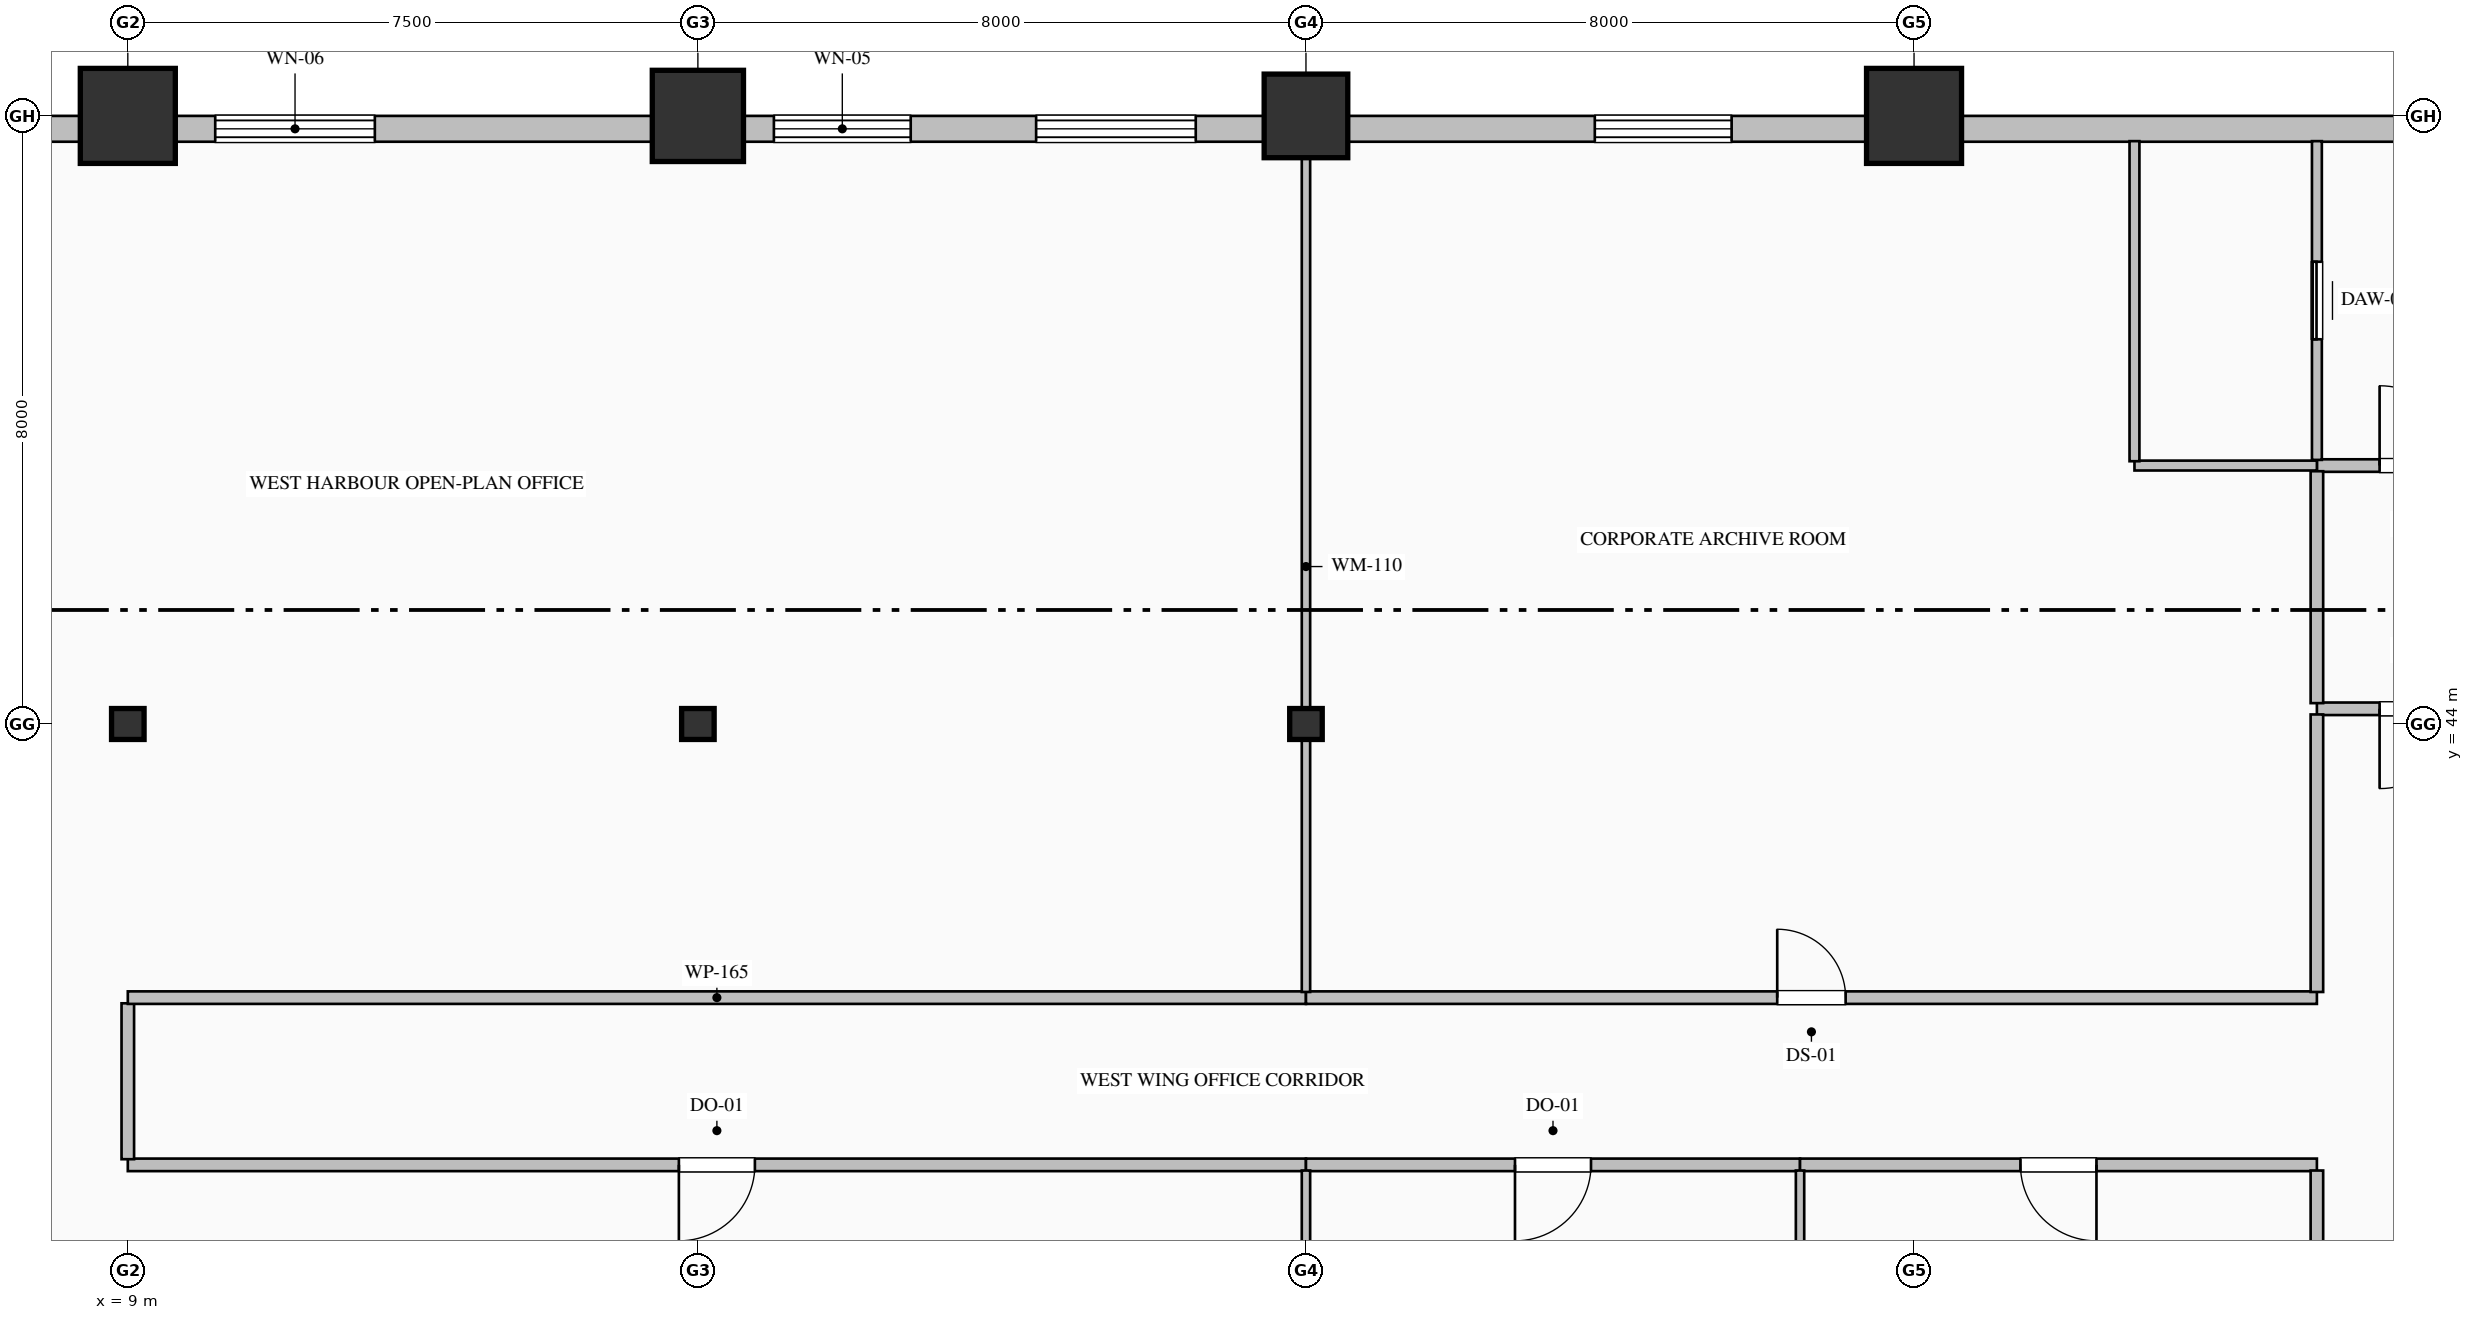
"""IFC4 building model, lengths in metres.
Left out: names, types, materials, properties, quantities, classifications, styles, units other than length and angle.
Written with IfcOpenShell. Run it as: python <this file> out.ifc"""

import sys

from ifc_helpers import new_model, si_unit, direction, frame, frame_2d, origin, origin_2d, place, context, subcontext, project, spatial, rectangle, hollow_rectangle, hollow_circle, i_section, extrude, element, fill, save


model = new_model("IFC4")
c1 = context("Model", 3, precision=1e-05, world=origin(), true_north=direction((0.0, 1.0)))
c2 = subcontext(c1, "Body", "Model", "MODEL_VIEW")
j1 = project(units=[si_unit("LENGTHUNIT", "METRE"), si_unit("PLANEANGLEUNIT", "RADIAN")], contexts=[c1])
p1 = place(None, origin())
s1 = spatial("IfcSite", under=j1, at=p1, CompositionType="ELEMENT")
p2 = place(p1, origin())
s2 = spatial("IfcBuilding", under=s1, at=p2, CompositionType="ELEMENT")
p3 = place(p2, frame((0.0, 0.0, 56.2)))
s3 = spatial("IfcBuildingStorey", under=s2, at=p3, CompositionType="ELEMENT", Elevation=56.2)
p4 = place(p3, frame((9.0, 44.0, 0.0), z_axis=(0.0, 0.0, 1.0), x_axis=(1.0, 0.0, 0.0)))
e1 = element("IfcColumn", 1, at=p4, inside=s3, PredefinedType="COLUMN", context=c2, shape_type="SweptSolid", body=[
    extrude(i_section(OverallWidth=0.407, OverallDepth=0.428, WebThickness=0.02, FlangeThickness=0.035, FilletRadius=0.022, at=origin_2d()), origin(), (0.0, 0.0, 1.0), 4.0),
])
p5 = place(p3, frame((9.0, 52.0, 0.0), z_axis=(0.0, 0.0, 1.0), x_axis=(1.0, 0.0, 0.0)))
e2 = element("IfcColumn", 2, at=p5, inside=s3, PredefinedType="COLUMN", context=c2, shape_type="SweptSolid", body=[
    extrude(hollow_rectangle(XDim=1.25, YDim=1.25, WallThickness=0.045, at=origin_2d()), origin(), (0.0, 0.0, 1.0), 4.0),
])
p6 = place(p3, frame((16.5, 44.0, 0.0), z_axis=(0.0, 0.0, 1.0), x_axis=(1.0, 0.0, 0.0)))
e3 = element("IfcColumn", 3, at=p6, inside=s3, PredefinedType="COLUMN", context=c2, shape_type="SweptSolid", body=[
    extrude(i_section(OverallWidth=0.407, OverallDepth=0.428, WebThickness=0.02, FlangeThickness=0.035, FilletRadius=0.022, at=origin_2d()), origin(), (0.0, 0.0, 1.0), 4.0),
])
p7 = place(p3, frame((16.5, 52.0, 0.0), z_axis=(0.0, 0.0, 1.0), x_axis=(1.0, 0.0, 0.0)))
e4 = element("IfcColumn", 4, at=p7, inside=s3, PredefinedType="COLUMN", context=c2, shape_type="SweptSolid", body=[
    extrude(hollow_circle(Radius=0.6, WallThickness=0.04, at=origin_2d()), origin(), (0.0, 0.0, 1.0), 4.0),
])
p8 = place(p3, frame((24.5, 44.0, 0.0), z_axis=(0.0, 0.0, 1.0), x_axis=(1.0, 0.0, 0.0)))
e5 = element("IfcColumn", 5, at=p8, inside=s3, PredefinedType="COLUMN", context=c2, shape_type="SweptSolid", body=[
    extrude(i_section(OverallWidth=0.407, OverallDepth=0.428, WebThickness=0.02, FlangeThickness=0.035, FilletRadius=0.022, at=origin_2d()), origin(), (0.0, 0.0, 1.0), 4.0),
])
p9 = place(p3, frame((24.5, 52.0, 0.0), z_axis=(0.0, 0.0, 1.0), x_axis=(1.0, 0.0, 0.0)))
e6 = element("IfcColumn", 6, at=p9, inside=s3, PredefinedType="COLUMN", context=c2, shape_type="SweptSolid", body=[
    extrude(hollow_rectangle(XDim=1.1, YDim=1.1, WallThickness=0.04, at=origin_2d()), origin(), (0.0, 0.0, 1.0), 4.0),
])
p10 = place(p3, frame((32.5, 52.0, 0.0), z_axis=(0.0, 0.0, 1.0), x_axis=(1.0, 0.0, 0.0)))
e7 = element("IfcColumn", 7, at=p10, inside=s3, PredefinedType="COLUMN", context=c2, shape_type="SweptSolid", body=[
    extrude(hollow_rectangle(XDim=1.25, YDim=1.25, WallThickness=0.045, at=origin_2d()), origin(), (0.0, 0.0, 1.0), 4.0),
])
p11 = place(p3, frame((4.0, 51.83, 0.0), z_axis=(0.0, 0.0, 1.0), x_axis=(1.0, 0.0, 0.0)))
e8 = element("IfcWall", 8, at=p11, inside=s3, PredefinedType="SOLIDWALL", context=c2, shape_type="SweptSolid", body=[
    extrude(rectangle(XDim=36.52, YDim=0.34, at=frame_2d((18.26, 0.0))), origin(), (0.0, 0.0, 1.0), 3.25),
])
p12 = place(p11, frame((6.15, 0.0, 0.85)))
e9 = element("IfcOpeningElement", 9, at=p12, cuts=e8, PredefinedType="OPENING", context=c2, shape_type="SweptSolid", body=[
    extrude(rectangle(XDim=2.1, YDim=2.05, at=frame_2d((1.05, 1.025))), frame((0.0, 0.18, 0.0), z_axis=(0.0, -1.0, 0.0), x_axis=(1.0, 0.0, 0.0)), (0.0, 0.0, 1.0), 0.36),
])
p13 = place(p11, frame((13.5, 0.0, 0.85)))
e10 = element("IfcOpeningElement", 10, at=p13, cuts=e8, PredefinedType="OPENING", context=c2, shape_type="SweptSolid", body=[
    extrude(rectangle(XDim=1.8, YDim=2.05, at=frame_2d((0.9, 1.025))), frame((0.0, 0.18, 0.0), z_axis=(0.0, -1.0, 0.0), x_axis=(1.0, 0.0, 0.0)), (0.0, 0.0, 1.0), 0.36),
])
p14 = place(p11, frame((16.95, 0.0, 0.85)))
e11 = element("IfcOpeningElement", 11, at=p14, cuts=e8, PredefinedType="OPENING", context=c2, shape_type="SweptSolid", body=[
    extrude(rectangle(XDim=2.1, YDim=2.05, at=frame_2d((1.05, 1.025))), frame((0.0, 0.18, 0.0), z_axis=(0.0, -1.0, 0.0), x_axis=(1.0, 0.0, 0.0)), (0.0, 0.0, 1.0), 0.36),
])
p15 = place(p11, frame((24.3, 0.0, 0.85)))
e12 = element("IfcOpeningElement", 12, at=p15, cuts=e8, PredefinedType="OPENING", context=c2, shape_type="SweptSolid", body=[
    extrude(rectangle(XDim=1.8, YDim=2.05, at=frame_2d((0.9, 1.025))), frame((0.0, 0.18, 0.0), z_axis=(0.0, -1.0, 0.0), x_axis=(1.0, 0.0, 0.0)), (0.0, 0.0, 1.0), 0.36),
])
p16 = place(p3, frame((37.8, 47.4, 0.0), z_axis=(0.0, 0.0, 1.0), x_axis=(1.0, 0.0, 0.0)))
e13 = element("IfcWall", 13, at=p16, inside=s3, PredefinedType="PARTITIONING", context=c2, shape_type="SweptSolid", body=[
    extrude(rectangle(XDim=2.7, YDim=0.165, at=frame_2d((1.35, 0.0))), origin(), (0.0, 0.0, 1.0), 3.75),
])
p17 = place(p16, frame((0.825, 0.0, 0.0)))
e14 = element("IfcOpeningElement", 14, at=p17, cuts=e13, PredefinedType="OPENING", context=c2, shape_type="SweptSolid", body=[
    extrude(rectangle(XDim=1.05, YDim=2.15, at=frame_2d((0.525, 1.075))), frame((0.0, 0.093, 0.0), z_axis=(0.0, -1.0, 0.0), x_axis=(1.0, 0.0, 0.0)), (0.0, 0.0, 1.0), 0.185),
])
p18 = place(p3, frame((40.5, 44.2, 0.0), z_axis=(0.0, 0.0, 1.0), x_axis=(-1.0, 0.0, 0.0)))
e15 = element("IfcWall", 15, at=p18, inside=s3, PredefinedType="PARTITIONING", context=c2, shape_type="SweptSolid", body=[
    extrude(rectangle(XDim=2.7, YDim=0.165, at=frame_2d((1.35, 0.0))), origin(), (0.0, 0.0, 1.0), 3.75),
])
p19 = place(p18, frame((0.825, 0.0, 0.0)))
e16 = element("IfcOpeningElement", 16, at=p19, cuts=e15, PredefinedType="OPENING", context=c2, shape_type="SweptSolid", body=[
    extrude(rectangle(XDim=1.05, YDim=2.15, at=frame_2d((0.525, 1.075))), frame((0.0, 0.093, 0.0), z_axis=(0.0, -1.0, 0.0), x_axis=(1.0, 0.0, 0.0)), (0.0, 0.0, 1.0), 0.185),
])
p20 = place(p3, frame((37.8, 44.274, 0.0), z_axis=(0.0, 0.0, 1.0), x_axis=(0.0, 1.0, 0.0)))
e17 = element("IfcWall", 17, at=p20, inside=s3, PredefinedType="PARTITIONING", context=c2, shape_type="SweptSolid", body=[
    extrude(rectangle(XDim=3.051, YDim=0.165, at=frame_2d((1.525, 0.0))), origin(), (0.0, 0.0, 1.0), 3.75),
])
p21 = place(p3, frame((37.8, 47.475, 0.0), z_axis=(0.0, 0.0, 1.0), x_axis=(0.0, 1.0, 0.0)))
e18 = element("IfcWall", 18, at=p21, inside=s3, PredefinedType="PARTITIONING", context=c2, shape_type="SweptSolid", body=[
    extrude(rectangle(XDim=4.193, YDim=0.13, at=frame_2d((2.097, 0.0))), origin(), (0.0, 0.0, 1.0), 3.75),
])
p22 = place(p21, frame((1.587, 0.0, 0.0)))
e19 = element("IfcOpeningElement", 19, at=p22, cuts=e18, PredefinedType="OPENING", context=c2, shape_type="SweptSolid", body=[
    extrude(rectangle(XDim=1.02, YDim=2.15, at=frame_2d((0.51, 1.075))), frame((0.0, 0.075, 0.0), z_axis=(0.0, -1.0, 0.0), x_axis=(1.0, 0.0, 0.0)), (0.0, 0.0, 1.0), 0.15),
])
p23 = place(p3, frame((37.8, 47.4, 0.0), z_axis=(0.0, 0.0, 1.0), x_axis=(-1.0, 0.0, 0.0)))
e20 = element("IfcWall", 20, at=p23, inside=s3, PredefinedType="PARTITIONING", context=c2, shape_type="SweptSolid", body=[
    extrude(rectangle(XDim=2.4, YDim=0.13, at=frame_2d((1.2, 0.0))), origin(), (0.0, 0.0, 1.0), 3.75),
])
p24 = place(p3, frame((35.4, 47.457, 0.0), z_axis=(0.0, 0.0, 1.0), x_axis=(0.0, 1.0, 0.0)))
e21 = element("IfcWall", 21, at=p24, inside=s3, PredefinedType="PARTITIONING", context=c2, shape_type="SweptSolid", body=[
    extrude(rectangle(XDim=4.211, YDim=0.13, at=frame_2d((2.105, 0.0))), origin(), (0.0, 0.0, 1.0), 3.75),
])
p25 = place(p3, frame((24.5, 38.2, 0.0), z_axis=(0.0, 0.0, 1.0), x_axis=(-1.0, 0.0, 0.0)))
e22 = element("IfcWall", 22, at=p25, inside=s3, PredefinedType="PARTITIONING", context=c2, shape_type="SweptSolid", body=[
    extrude(rectangle(XDim=15.5, YDim=0.165, at=frame_2d((7.75, 0.0))), origin(), (0.0, 0.0, 1.0), 3.75),
])
p26 = place(p25, frame((7.25, 0.0, 0.0)))
e23 = element("IfcOpeningElement", 23, at=p26, cuts=e22, PredefinedType="OPENING", context=c2, shape_type="SweptSolid", body=[
    extrude(rectangle(XDim=1.0, YDim=2.15, at=frame_2d((0.5, 1.075))), frame((0.0, 0.093, 0.0), z_axis=(0.0, -1.0, 0.0), x_axis=(1.0, 0.0, 0.0)), (0.0, 0.0, 1.0), 0.185),
])
p27 = place(p3, frame((9.0, 38.274, 0.0), z_axis=(0.0, 0.0, 1.0), x_axis=(0.0, 1.0, 0.0)))
e24 = element("IfcWall", 24, at=p27, inside=s3, PredefinedType="PARTITIONING", context=c2, shape_type="SweptSolid", body=[
    extrude(rectangle(XDim=2.051, YDim=0.165, at=frame_2d((1.025, 0.0))), origin(), (0.0, 0.0, 1.0), 3.042),
])
p28 = place(p3, frame((9.0, 40.4, 0.0), z_axis=(0.0, 0.0, 1.0), x_axis=(1.0, 0.0, 0.0)))
e25 = element("IfcWall", 25, at=p28, inside=s3, PredefinedType="PARTITIONING", context=c2, shape_type="SweptSolid", body=[
    extrude(rectangle(XDim=15.5, YDim=0.165, at=frame_2d((7.75, 0.0))), origin(), (0.0, 0.0, 1.0), 3.75),
])
p29 = place(p3, frame((24.5, 40.4, 0.0), z_axis=(0.0, 0.0, 1.0), x_axis=(1.0, 0.0, 0.0)))
e26 = element("IfcWall", 26, at=p29, inside=s3, PredefinedType="PARTITIONING", context=c2, shape_type="SweptSolid", body=[
    extrude(rectangle(XDim=13.3, YDim=0.165, at=frame_2d((6.65, 0.0))), origin(), (0.0, 0.0, 1.0), 3.75),
])
p30 = place(p29, frame((6.2, 0.0, 0.0)))
e27 = element("IfcOpeningElement", 27, at=p30, cuts=e26, PredefinedType="OPENING", context=c2, shape_type="SweptSolid", body=[
    extrude(rectangle(XDim=0.9, YDim=2.15, at=frame_2d((0.45, 1.075))), frame((0.0, 0.093, 0.0), z_axis=(0.0, -1.0, 0.0), x_axis=(1.0, 0.0, 0.0)), (0.0, 0.0, 1.0), 0.185),
])
p31 = place(p3, frame((31.0, 38.2, 0.0), z_axis=(0.0, 0.0, 1.0), x_axis=(-1.0, 0.0, 0.0)))
e28 = element("IfcWall", 28, at=p31, inside=s3, PredefinedType="PARTITIONING", context=c2, shape_type="SweptSolid", body=[
    extrude(rectangle(XDim=6.5, YDim=0.165, at=frame_2d((3.25, 0.0))), origin(), (0.0, 0.0, 1.0), 3.75),
])
p32 = place(p31, frame((2.75, 0.0, 0.0)))
e29 = element("IfcOpeningElement", 29, at=p32, cuts=e28, PredefinedType="OPENING", context=c2, shape_type="SweptSolid", body=[
    extrude(rectangle(XDim=1.0, YDim=2.15, at=frame_2d((0.5, 1.075))), frame((0.0, 0.093, 0.0), z_axis=(0.0, -1.0, 0.0), x_axis=(1.0, 0.0, 0.0)), (0.0, 0.0, 1.0), 0.185),
])
p33 = place(p3, frame((37.8, 38.2, 0.0), z_axis=(0.0, 0.0, 1.0), x_axis=(-1.0, 0.0, 0.0)))
e30 = element("IfcWall", 30, at=p33, inside=s3, PredefinedType="PARTITIONING", context=c2, shape_type="SweptSolid", body=[
    extrude(rectangle(XDim=6.8, YDim=0.165, at=frame_2d((3.4, 0.0))), origin(), (0.0, 0.0, 1.0), 3.75),
])
p34 = place(p33, frame((2.9, 0.0, 0.0)))
e31 = element("IfcOpeningElement", 31, at=p34, cuts=e30, PredefinedType="OPENING", context=c2, shape_type="SweptSolid", body=[
    extrude(rectangle(XDim=1.0, YDim=2.15, at=frame_2d((0.5, 1.075))), frame((0.0, 0.093, 0.0), z_axis=(0.0, -1.0, 0.0), x_axis=(1.0, 0.0, 0.0)), (0.0, 0.0, 1.0), 0.185),
])
p35 = place(p3, frame((37.8, 40.475, 0.0), z_axis=(0.0, 0.0, 1.0), x_axis=(0.0, 1.0, 0.0)))
e32 = element("IfcWall", 32, at=p35, inside=s3, PredefinedType="PARTITIONING", context=c2, shape_type="SweptSolid", body=[
    extrude(rectangle(XDim=3.651, YDim=0.165, at=frame_2d((1.825, 0.0))), origin(), (0.0, 0.0, 1.0), 3.75),
])
p36 = place(p3, frame((37.8, 31.6, 0.0), z_axis=(0.0, 0.0, 1.0), x_axis=(0.0, 1.0, 0.0)))
e33 = element("IfcWall", 33, at=p36, inside=s3, PredefinedType="PARTITIONING", context=c2, shape_type="SweptSolid", body=[
    extrude(rectangle(XDim=6.525, YDim=0.165, at=frame_2d((3.263, 0.0))), origin(), (0.0, 0.0, 1.0), 3.75),
])
p37 = place(p3, frame((24.5, 51.668, 0.0), z_axis=(0.0, 0.0, 1.0), x_axis=(0.0, -1.0, 0.0)))
e34 = element("IfcWall", 34, at=p37, inside=s3, PredefinedType="MOVABLE", context=c2, shape_type="SweptSolid", body=[
    extrude(rectangle(XDim=11.193, YDim=0.11, at=frame_2d((5.597, 0.0))), origin(), (0.0, 0.0, 1.0), 3.042),
])
p38 = place(p3, frame((24.5, 38.125, 0.0), z_axis=(0.0, 0.0, 1.0), x_axis=(0.0, -1.0, 0.0)))
e35 = element("IfcWall", 35, at=p38, inside=s3, PredefinedType="MOVABLE", context=c2, shape_type="SweptSolid", body=[
    extrude(rectangle(XDim=9.793, YDim=0.11, at=frame_2d((4.897, 0.0))), origin(), (0.0, 0.0, 1.0), 3.042),
])
p39 = place(p3, frame((31.0, 38.125, 0.0), z_axis=(0.0, 0.0, 1.0), x_axis=(0.0, -1.0, 0.0)))
e36 = element("IfcWall", 36, at=p39, inside=s3, PredefinedType="MOVABLE", context=c2, shape_type="SweptSolid", body=[
    extrude(rectangle(XDim=9.793, YDim=0.11, at=frame_2d((4.897, 0.0))), origin(), (0.0, 0.0, 1.0), 3.75),
])
p40 = place(p12, origin())
e37 = element("IfcWindow", 37, at=p40, inside=s3, PartitioningType="TRIPLE_PANEL_VERTICAL", PredefinedType="WINDOW", context=c2, shape_type="SweptSolid", body=[
    extrude(rectangle(XDim=2.1, YDim=2.05, at=frame_2d((1.05, 1.025))), frame((0.0, 0.15, 0.0), z_axis=(0.0, -1.0, 0.0), x_axis=(1.0, 0.0, 0.0)), (0.0, 0.0, 1.0), 0.06),
])
fill(e9, e37)
p41 = place(p13, origin())
e38 = element("IfcWindow", 38, at=p41, inside=s3, PartitioningType="TRIPLE_PANEL_VERTICAL", PredefinedType="WINDOW", context=c2, shape_type="SweptSolid", body=[
    extrude(rectangle(XDim=1.8, YDim=2.05, at=frame_2d((0.9, 1.025))), frame((0.0, 0.15, 0.0), z_axis=(0.0, -1.0, 0.0), x_axis=(1.0, 0.0, 0.0)), (0.0, 0.0, 1.0), 0.06),
])
fill(e10, e38)
p42 = place(p14, origin())
e39 = element("IfcWindow", 39, at=p42, inside=s3, PartitioningType="TRIPLE_PANEL_VERTICAL", PredefinedType="WINDOW", context=c2, shape_type="SweptSolid", body=[
    extrude(rectangle(XDim=2.1, YDim=2.05, at=frame_2d((1.05, 1.025))), frame((0.0, 0.15, 0.0), z_axis=(0.0, -1.0, 0.0), x_axis=(1.0, 0.0, 0.0)), (0.0, 0.0, 1.0), 0.06),
])
fill(e11, e39)
p43 = place(p15, origin())
e40 = element("IfcWindow", 40, at=p43, inside=s3, PartitioningType="TRIPLE_PANEL_VERTICAL", PredefinedType="WINDOW", context=c2, shape_type="SweptSolid", body=[
    extrude(rectangle(XDim=1.8, YDim=2.05, at=frame_2d((0.9, 1.025))), frame((0.0, 0.15, 0.0), z_axis=(0.0, -1.0, 0.0), x_axis=(1.0, 0.0, 0.0)), (0.0, 0.0, 1.0), 0.06),
])
fill(e12, e40)
p44 = place(p17, origin())
e41 = element("IfcDoor", 41, at=p44, inside=s3, OperationType="SINGLE_SWING_LEFT", PredefinedType="DOOR", context=c2, shape_type="SweptSolid", body=[
    extrude(rectangle(XDim=1.05, YDim=2.15, at=frame_2d((0.525, 1.075))), frame((0.0, 0.025, 0.0), z_axis=(0.0, -1.0, 0.0), x_axis=(1.0, 0.0, 0.0)), (0.0, 0.0, 1.0), 0.05),
])
fill(e14, e41)
p45 = place(p19, origin())
e42 = element("IfcDoor", 42, at=p45, inside=s3, OperationType="SINGLE_SWING_RIGHT", PredefinedType="DOOR", context=c2, shape_type="SweptSolid", body=[
    extrude(rectangle(XDim=1.05, YDim=2.15, at=frame_2d((0.525, 1.075))), frame((0.0, 0.025, 0.0), z_axis=(0.0, -1.0, 0.0), x_axis=(1.0, 0.0, 0.0)), (0.0, 0.0, 1.0), 0.05),
])
fill(e16, e42)
p46 = place(p22, origin())
e43 = element("IfcDoor", 43, at=p46, inside=s3, OperationType="SLIDING_TO_LEFT", PredefinedType="DOOR", context=c2, shape_type="SweptSolid", body=[
    extrude(rectangle(XDim=1.02, YDim=2.15, at=frame_2d((0.51, 1.075))), frame((0.0, 0.025, 0.0), z_axis=(0.0, -1.0, 0.0), x_axis=(1.0, 0.0, 0.0)), (0.0, 0.0, 1.0), 0.05),
])
fill(e19, e43)
p47 = place(p26, origin())
e44 = element("IfcDoor", 44, at=p47, inside=s3, OperationType="SINGLE_SWING_RIGHT", PredefinedType="DOOR", context=c2, shape_type="SweptSolid", body=[
    extrude(rectangle(XDim=1.0, YDim=2.15, at=frame_2d((0.5, 1.075))), frame((0.0, 0.025, 0.0), z_axis=(0.0, -1.0, 0.0), x_axis=(1.0, 0.0, 0.0)), (0.0, 0.0, 1.0), 0.05),
])
fill(e23, e44)
p48 = place(p30, origin())
e45 = element("IfcDoor", 45, at=p48, inside=s3, OperationType="SINGLE_SWING_LEFT", PredefinedType="DOOR", context=c2, shape_type="SweptSolid", body=[
    extrude(rectangle(XDim=0.9, YDim=2.15, at=frame_2d((0.45, 1.075))), frame((0.0, 0.025, 0.0), z_axis=(0.0, -1.0, 0.0), x_axis=(1.0, 0.0, 0.0)), (0.0, 0.0, 1.0), 0.05),
])
fill(e27, e45)
p49 = place(p32, origin())
e46 = element("IfcDoor", 46, at=p49, inside=s3, OperationType="SINGLE_SWING_RIGHT", PredefinedType="DOOR", context=c2, shape_type="SweptSolid", body=[
    extrude(rectangle(XDim=1.0, YDim=2.15, at=frame_2d((0.5, 1.075))), frame((0.0, 0.025, 0.0), z_axis=(0.0, -1.0, 0.0), x_axis=(1.0, 0.0, 0.0)), (0.0, 0.0, 1.0), 0.05),
])
fill(e29, e46)
p50 = place(p34, origin())
e47 = element("IfcDoor", 47, at=p50, inside=s3, OperationType="SINGLE_SWING_LEFT", PredefinedType="DOOR", context=c2, shape_type="SweptSolid", body=[
    extrude(rectangle(XDim=1.0, YDim=2.15, at=frame_2d((0.5, 1.075))), frame((0.0, 0.025, 0.0), z_axis=(0.0, -1.0, 0.0), x_axis=(1.0, 0.0, 0.0)), (0.0, 0.0, 1.0), 0.05),
])
fill(e31, e47)
save(model, sys.argv[1])
